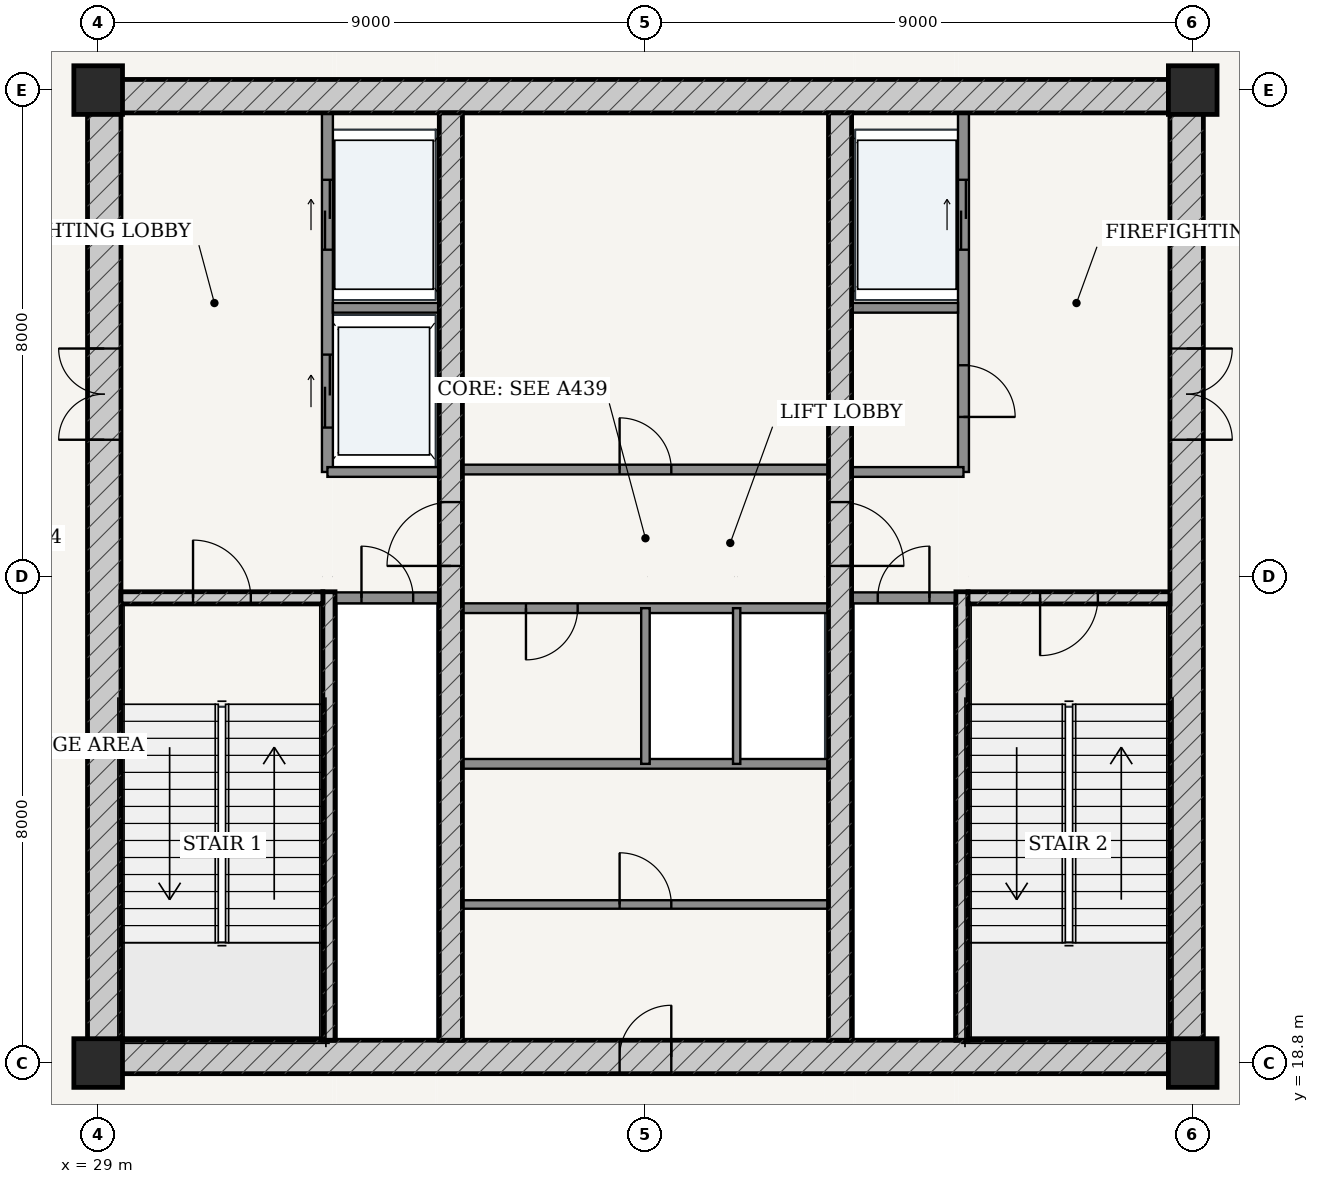
"""IFC4 building model, lengths in metres.
Left out: names, types, materials, properties, quantities, classifications, styles, units other than length and angle.
Written with IfcOpenShell. Run it as: python <this file> out.ifc"""

import sys

from ifc_helpers import new_model, si_unit, direction, frame, frame_2d, origin, origin_2d, place, context, subcontext, project, spatial, rectangle, extrude, source, transform, mapped, element, fill, save


model = new_model("IFC4")
c1 = context("Model", 3, precision=1e-05, world=origin(), true_north=direction((-0.2419218956, 0.970295726276)))
c2 = subcontext(c1, "Body", "Model", "MODEL_VIEW")
j1 = project(units=[si_unit("LENGTHUNIT", "METRE"), si_unit("PLANEANGLEUNIT", "RADIAN")], contexts=[c1])
p1 = place(None, origin())
s1 = spatial("IfcSite", under=j1, at=p1, CompositionType="ELEMENT")
p2 = place(p1, origin())
s2 = spatial("IfcBuilding", under=s1, at=p2, CompositionType="ELEMENT")
p3 = place(p2, frame((0.0, 0.0, 300.7)))
s3 = spatial("IfcBuildingStorey", under=s2, at=p3, CompositionType="ELEMENT", Elevation=300.7)
for number, where, z_axis, x_axis in (
    (1, (29.0, 18.8, 0.0), (0.0, 0.0, 1.0), (1.0, 0.0, 0.0)),
    (2, (47.0, 18.8, 0.0), (0.0, 0.0, 1.0), (1.0, 0.0, 0.0)),
    (3, (47.0, 34.8, 0.0), (0.0, 0.0, 1.0), (1.0, 0.0, 0.0)),
    (4, (29.0, 34.8, 0.0), (0.0, 0.0, 1.0), (1.0, 0.0, 0.0)),
):
    element("IfcColumn", number, at=place(p3, frame(where, z_axis=z_axis, x_axis=x_axis)), inside=s3, PredefinedType="COLUMN", context=c2, shape_type="SweptSolid", body=[
        extrude(rectangle(XDim=0.8, YDim=0.8, at=origin_2d()), origin(), (0.0, 0.0, 1.0), 5.4),
    ])
p4 = place(p3, frame((28.825, 18.9, 0.0), z_axis=(0.0, 0.0, 1.0), x_axis=(1.0, 0.0, 0.0)))
e5 = element("IfcWall", 5, at=p4, inside=s3, PredefinedType="SHEAR", context=c2, shape_type="SweptSolid", body=[
    extrude(rectangle(XDim=18.35, YDim=0.55, at=frame_2d((9.175, 0.0))), origin(), (0.0, 0.0, 1.0), 4.98),
])
p5 = place(p4, frame((8.75, 0.0, 0.0)))
e6 = element("IfcOpeningElement", 6, at=p5, cuts=e5, PredefinedType="OPENING", context=c2, shape_type="SweptSolid", body=[
    extrude(rectangle(XDim=0.85, YDim=2.1, at=frame_2d((0.425, 1.05))), frame((0.0, 0.285, 0.0), z_axis=(0.0, -1.0, 0.0), x_axis=(1.0, 0.0, 0.0)), (0.0, 0.0, 1.0), 0.57),
])
p6 = place(p3, frame((28.825, 34.7, 0.0), z_axis=(0.0, 0.0, 1.0), x_axis=(1.0, 0.0, 0.0)))
e7 = element("IfcWall", 7, at=p6, inside=s3, PredefinedType="SHEAR", context=c2, shape_type="SweptSolid", body=[
    extrude(rectangle(XDim=18.35, YDim=0.55, at=frame_2d((9.175, 0.0))), origin(), (0.0, 0.0, 1.0), 4.98),
])
p7 = place(p3, frame((29.1, 19.175, 0.0), z_axis=(0.0, 0.0, 1.0), x_axis=(0.0, 1.0, 0.0)))
e8 = element("IfcWall", 8, at=p7, inside=s3, PredefinedType="SHEAR", context=c2, shape_type="SweptSolid", body=[
    extrude(rectangle(XDim=15.25, YDim=0.55, at=frame_2d((7.625, 0.0))), origin(), (0.0, 0.0, 1.0), 4.98),
])
p8 = place(p7, frame((9.875, 0.0, 0.0)))
e9 = element("IfcOpeningElement", 9, at=p8, cuts=e8, PredefinedType="OPENING", context=c2, shape_type="SweptSolid", body=[
    extrude(rectangle(XDim=1.5, YDim=2.2, at=frame_2d((0.75, 1.1))), frame((0.0, 0.285, 0.0), z_axis=(0.0, -1.0, 0.0), x_axis=(1.0, 0.0, 0.0)), (0.0, 0.0, 1.0), 0.57),
])
p9 = place(p3, frame((46.9, 19.175, 0.0), z_axis=(0.0, 0.0, 1.0), x_axis=(0.0, 1.0, 0.0)))
e10 = element("IfcWall", 10, at=p9, inside=s3, PredefinedType="SHEAR", context=c2, shape_type="SweptSolid", body=[
    extrude(rectangle(XDim=15.25, YDim=0.55, at=frame_2d((7.625, 0.0))), origin(), (0.0, 0.0, 1.0), 4.98),
])
p10 = place(p9, frame((9.875, 0.0, 0.0)))
e11 = element("IfcOpeningElement", 11, at=p10, cuts=e10, PredefinedType="OPENING", context=c2, shape_type="SweptSolid", body=[
    extrude(rectangle(XDim=1.5, YDim=2.2, at=frame_2d((0.75, 1.1))), frame((0.0, 0.285, 0.0), z_axis=(0.0, -1.0, 0.0), x_axis=(1.0, 0.0, 0.0)), (0.0, 0.0, 1.0), 0.57),
])
p11 = place(p3, frame((32.795, 19.175, 0.0), z_axis=(0.0, 0.0, 1.0), x_axis=(0.0, 1.0, 0.0)))
e12 = element("IfcWall", 12, at=p11, inside=s3, PredefinedType="SOLIDWALL", context=c2, shape_type="SweptSolid", body=[
    extrude(rectangle(XDim=7.375, YDim=0.2, at=frame_2d((3.688, 0.0))), origin(), (0.0, 0.0, 1.0), 4.98),
])
p12 = place(p3, frame((29.375, 26.45, 0.0), z_axis=(0.0, 0.0, 1.0), x_axis=(1.0, 0.0, 0.0)))
e13 = element("IfcWall", 13, at=p12, inside=s3, PredefinedType="SOLIDWALL", context=c2, shape_type="SweptSolid", body=[
    extrude(rectangle(XDim=3.32, YDim=0.2, at=frame_2d((1.66, 0.0))), origin(), (0.0, 0.0, 1.0), 4.98),
])
p13 = place(p12, frame((1.185, 0.0, 0.0)))
e14 = element("IfcOpeningElement", 14, at=p13, cuts=e13, PredefinedType="OPENING", context=c2, shape_type="SweptSolid", body=[
    extrude(rectangle(XDim=0.95, YDim=2.15, at=frame_2d((0.475, 1.075))), frame((0.0, 0.11, 0.0), z_axis=(0.0, -1.0, 0.0), x_axis=(1.0, 0.0, 0.0)), (0.0, 0.0, 1.0), 0.22),
])
p14 = place(p3, frame((43.205, 19.175, 0.0), z_axis=(0.0, 0.0, 1.0), x_axis=(0.0, 1.0, 0.0)))
e15 = element("IfcWall", 15, at=p14, inside=s3, PredefinedType="SOLIDWALL", context=c2, shape_type="SweptSolid", body=[
    extrude(rectangle(XDim=7.375, YDim=0.2, at=frame_2d((3.688, 0.0))), origin(), (0.0, 0.0, 1.0), 4.98),
])
p15 = place(p3, frame((43.305, 26.45, 0.0), z_axis=(0.0, 0.0, 1.0), x_axis=(1.0, 0.0, 0.0)))
e16 = element("IfcWall", 16, at=p15, inside=s3, PredefinedType="SOLIDWALL", context=c2, shape_type="SweptSolid", body=[
    extrude(rectangle(XDim=3.32, YDim=0.2, at=frame_2d((1.66, 0.0))), origin(), (0.0, 0.0, 1.0), 4.98),
])
p16 = place(p15, frame((1.185, 0.0, 0.0)))
e17 = element("IfcOpeningElement", 17, at=p16, cuts=e16, PredefinedType="OPENING", context=c2, shape_type="SweptSolid", body=[
    extrude(rectangle(XDim=0.95, YDim=2.15, at=frame_2d((0.475, 1.075))), frame((0.0, 0.11, 0.0), z_axis=(0.0, -1.0, 0.0), x_axis=(1.0, 0.0, 0.0)), (0.0, 0.0, 1.0), 0.22),
])
p17 = place(p3, frame((34.8, 19.175, 0.0), z_axis=(0.0, 0.0, 1.0), x_axis=(0.0, 1.0, 0.0)))
e18 = element("IfcWall", 18, at=p17, inside=s3, PredefinedType="SHEAR", context=c2, shape_type="SweptSolid", body=[
    extrude(rectangle(XDim=15.25, YDim=0.38, at=frame_2d((7.625, 0.0))), origin(), (0.0, 0.0, 1.0), 4.98),
])
p18 = place(p17, frame((7.8, 0.0, 0.0)))
e19 = element("IfcOpeningElement", 19, at=p18, cuts=e18, PredefinedType="OPENING", context=c2, shape_type="SweptSolid", body=[
    extrude(rectangle(XDim=1.05, YDim=2.15, at=frame_2d((0.525, 1.075))), frame((0.0, 0.2, 0.0), z_axis=(0.0, -1.0, 0.0), x_axis=(1.0, 0.0, 0.0)), (0.0, 0.0, 1.0), 0.4),
])
p19 = place(p3, frame((41.2, 19.175, 0.0), z_axis=(0.0, 0.0, 1.0), x_axis=(0.0, 1.0, 0.0)))
e20 = element("IfcWall", 20, at=p19, inside=s3, PredefinedType="SHEAR", context=c2, shape_type="SweptSolid", body=[
    extrude(rectangle(XDim=15.25, YDim=0.38, at=frame_2d((7.625, 0.0))), origin(), (0.0, 0.0, 1.0), 4.98),
])
p20 = place(p19, frame((7.8, 0.0, 0.0)))
e21 = element("IfcOpeningElement", 21, at=p20, cuts=e20, PredefinedType="OPENING", context=c2, shape_type="SweptSolid", body=[
    extrude(rectangle(XDim=1.05, YDim=2.15, at=frame_2d((0.525, 1.075))), frame((0.0, 0.2, 0.0), z_axis=(0.0, -1.0, 0.0), x_axis=(1.0, 0.0, 0.0)), (0.0, 0.0, 1.0), 0.4),
])
p21 = place(p3, frame((32.9, 26.45, 0.0), z_axis=(0.0, 0.0, 1.0), x_axis=(1.0, 0.0, 0.0)))
e22 = element("IfcWall", 22, at=p21, inside=s3, PredefinedType="PARTITIONING", context=c2, shape_type="SweptSolid", body=[
    extrude(rectangle(XDim=1.71, YDim=0.18, at=frame_2d((0.855, 0.0))), origin(), (0.0, 0.0, 1.0), 4.98),
])
p22 = place(p21, frame((0.43, 0.0, 0.0)))
e23 = element("IfcOpeningElement", 23, at=p22, cuts=e22, PredefinedType="OPENING", context=c2, shape_type="SweptSolid", body=[
    extrude(rectangle(XDim=0.85, YDim=2.1, at=frame_2d((0.425, 1.05))), frame((0.0, 0.1, 0.0), z_axis=(0.0, -1.0, 0.0), x_axis=(1.0, 0.0, 0.0)), (0.0, 0.0, 1.0), 0.2),
])
p23 = place(p3, frame((41.39, 26.45, 0.0), z_axis=(0.0, 0.0, 1.0), x_axis=(1.0, 0.0, 0.0)))
e24 = element("IfcWall", 24, at=p23, inside=s3, PredefinedType="PARTITIONING", context=c2, shape_type="SweptSolid", body=[
    extrude(rectangle(XDim=1.71, YDim=0.18, at=frame_2d((0.855, 0.0))), origin(), (0.0, 0.0, 1.0), 4.98),
])
p24 = place(p23, frame((0.43, 0.0, 0.0)))
e25 = element("IfcOpeningElement", 25, at=p24, cuts=e24, PredefinedType="OPENING", context=c2, shape_type="SweptSolid", body=[
    extrude(rectangle(XDim=0.85, YDim=2.1, at=frame_2d((0.425, 1.05))), frame((0.0, 0.1, 0.0), z_axis=(0.0, -1.0, 0.0), x_axis=(1.0, 0.0, 0.0)), (0.0, 0.0, 1.0), 0.2),
])
p25 = place(p3, frame((32.77, 28.52, 0.0), z_axis=(0.0, 0.0, 1.0), x_axis=(0.0, 1.0, 0.0)))
e26 = element("IfcWall", 26, at=p25, inside=s3, PredefinedType="PARTITIONING", context=c2, shape_type="SweptSolid", body=[
    extrude(rectangle(XDim=5.905, YDim=0.18, at=frame_2d((2.953, 0.0))), origin(), (0.0, 0.0, 1.0), 4.98),
])
p26 = place(p25, frame((3.655, 0.0, 0.0)))
e27 = element("IfcOpeningElement", 27, at=p26, cuts=e26, PredefinedType="OPENING", context=c2, shape_type="SweptSolid", body=[
    extrude(rectangle(XDim=1.15, YDim=2.2, at=frame_2d((0.575, 1.1))), frame((0.0, 0.1, 0.0), z_axis=(0.0, -1.0, 0.0), x_axis=(1.0, 0.0, 0.0)), (0.0, 0.0, 1.0), 0.2),
])
p27 = place(p25, frame((0.73, 0.0, 0.0)))
e28 = element("IfcOpeningElement", 28, at=p27, cuts=e26, PredefinedType="OPENING", context=c2, shape_type="SweptSolid", body=[
    extrude(rectangle(XDim=1.2, YDim=2.25, at=frame_2d((0.6, 1.125))), frame((0.0, 0.1, 0.0), z_axis=(0.0, -1.0, 0.0), x_axis=(1.0, 0.0, 0.0)), (0.0, 0.0, 1.0), 0.2),
])
p28 = place(p3, frame((32.86, 31.22, 0.0), z_axis=(0.0, 0.0, 1.0), x_axis=(1.0, 0.0, 0.0)))
e29 = element("IfcWall", 29, at=p28, inside=s3, PredefinedType="PARTITIONING", context=c2, shape_type="SweptSolid", body=[
    extrude(rectangle(XDim=1.75, YDim=0.16, at=frame_2d((0.875, 0.0))), origin(), (0.0, 0.0, 1.0), 4.98),
])
p29 = place(p3, frame((32.77, 28.52, 0.0), z_axis=(0.0, 0.0, 1.0), x_axis=(1.0, 0.0, 0.0)))
e30 = element("IfcWall", 30, at=p29, inside=s3, PredefinedType="PARTITIONING", context=c2, shape_type="SweptSolid", body=[
    extrude(rectangle(XDim=1.84, YDim=0.16, at=frame_2d((0.92, 0.0))), origin(), (0.0, 0.0, 1.0), 4.98),
])
p30 = place(p3, frame((43.23, 28.52, 0.0), z_axis=(0.0, 0.0, 1.0), x_axis=(0.0, 1.0, 0.0)))
e31 = element("IfcWall", 31, at=p30, inside=s3, PredefinedType="PARTITIONING", context=c2, shape_type="SweptSolid", body=[
    extrude(rectangle(XDim=5.905, YDim=0.18, at=frame_2d((2.953, 0.0))), origin(), (0.0, 0.0, 1.0), 4.98),
])
p31 = place(p30, frame((0.905, 0.0, 0.0)))
e32 = element("IfcOpeningElement", 32, at=p31, cuts=e31, PredefinedType="OPENING", context=c2, shape_type="SweptSolid", body=[
    extrude(rectangle(XDim=0.85, YDim=2.1, at=frame_2d((0.425, 1.05))), frame((0.0, 0.1, 0.0), z_axis=(0.0, -1.0, 0.0), x_axis=(1.0, 0.0, 0.0)), (0.0, 0.0, 1.0), 0.2),
])
p32 = place(p30, frame((3.655, 0.0, 0.0)))
e33 = element("IfcOpeningElement", 33, at=p32, cuts=e31, PredefinedType="OPENING", context=c2, shape_type="SweptSolid", body=[
    extrude(rectangle(XDim=1.15, YDim=2.2, at=frame_2d((0.575, 1.1))), frame((0.0, 0.1, 0.0), z_axis=(0.0, -1.0, 0.0), x_axis=(1.0, 0.0, 0.0)), (0.0, 0.0, 1.0), 0.2),
])
p33 = place(p3, frame((41.39, 31.22, 0.0), z_axis=(0.0, 0.0, 1.0), x_axis=(1.0, 0.0, 0.0)))
e34 = element("IfcWall", 34, at=p33, inside=s3, PredefinedType="PARTITIONING", context=c2, shape_type="SweptSolid", body=[
    extrude(rectangle(XDim=1.75, YDim=0.16, at=frame_2d((0.875, 0.0))), origin(), (0.0, 0.0, 1.0), 4.98),
])
p34 = place(p3, frame((41.39, 28.52, 0.0), z_axis=(0.0, 0.0, 1.0), x_axis=(1.0, 0.0, 0.0)))
e35 = element("IfcWall", 35, at=p34, inside=s3, PredefinedType="PARTITIONING", context=c2, shape_type="SweptSolid", body=[
    extrude(rectangle(XDim=1.84, YDim=0.16, at=frame_2d((0.92, 0.0))), origin(), (0.0, 0.0, 1.0), 4.98),
])
p35 = place(p3, frame((34.99, 28.56, 0.0), z_axis=(0.0, 0.0, 1.0), x_axis=(1.0, 0.0, 0.0)))
e36 = element("IfcWall", 36, at=p35, inside=s3, PredefinedType="PARTITIONING", context=c2, shape_type="SweptSolid", body=[
    extrude(rectangle(XDim=6.02, YDim=0.16, at=frame_2d((3.01, 0.0))), origin(), (0.0, 0.0, 1.0), 4.98),
])
p36 = place(p35, frame((2.585, 0.0, 0.0)))
e37 = element("IfcOpeningElement", 37, at=p36, cuts=e36, PredefinedType="OPENING", context=c2, shape_type="SweptSolid", body=[
    extrude(rectangle(XDim=0.85, YDim=2.1, at=frame_2d((0.425, 1.05))), frame((0.0, 0.09, 0.0), z_axis=(0.0, -1.0, 0.0), x_axis=(1.0, 0.0, 0.0)), (0.0, 0.0, 1.0), 0.18),
])
p37 = place(p3, frame((34.99, 26.28, 0.0), z_axis=(0.0, 0.0, 1.0), x_axis=(1.0, 0.0, 0.0)))
e38 = element("IfcWall", 38, at=p37, inside=s3, PredefinedType="PARTITIONING", context=c2, shape_type="SweptSolid", body=[
    extrude(rectangle(XDim=6.02, YDim=0.16, at=frame_2d((3.01, 0.0))), origin(), (0.0, 0.0, 1.0), 4.98),
])
p38 = place(p37, frame((1.045, 0.0, 0.0)))
e39 = element("IfcOpeningElement", 39, at=p38, cuts=e38, PredefinedType="OPENING", context=c2, shape_type="SweptSolid", body=[
    extrude(rectangle(XDim=0.85, YDim=2.1, at=frame_2d((0.425, 1.05))), frame((0.0, 0.09, 0.0), z_axis=(0.0, -1.0, 0.0), x_axis=(1.0, 0.0, 0.0)), (0.0, 0.0, 1.0), 0.18),
])
p39 = place(p3, frame((34.99, 23.72, 0.0), z_axis=(0.0, 0.0, 1.0), x_axis=(1.0, 0.0, 0.0)))
e40 = element("IfcWall", 40, at=p39, inside=s3, PredefinedType="PARTITIONING", context=c2, shape_type="SweptSolid", body=[
    extrude(rectangle(XDim=6.02, YDim=0.16, at=frame_2d((3.01, 0.0))), origin(), (0.0, 0.0, 1.0), 4.98),
])
p40 = place(p3, frame((38.0, 23.72, 0.0), z_axis=(0.0, 0.0, 1.0), x_axis=(0.0, 1.0, 0.0)))
e41 = element("IfcWall", 41, at=p40, inside=s3, PredefinedType="PARTITIONING", context=c2, shape_type="SweptSolid", body=[
    extrude(rectangle(XDim=2.56, YDim=0.14, at=frame_2d((1.28, 0.0))), origin(), (0.0, 0.0, 1.0), 4.98),
])
p41 = place(p3, frame((39.5, 23.72, 0.0), z_axis=(0.0, 0.0, 1.0), x_axis=(0.0, 1.0, 0.0)))
e42 = element("IfcWall", 42, at=p41, inside=s3, PredefinedType="PARTITIONING", context=c2, shape_type="SweptSolid", body=[
    extrude(rectangle(XDim=2.56, YDim=0.12, at=frame_2d((1.28, 0.0))), origin(), (0.0, 0.0, 1.0), 4.98),
])
p42 = place(p3, frame((34.99, 21.407, 0.0), z_axis=(0.0, 0.0, 1.0), x_axis=(1.0, 0.0, 0.0)))
e43 = element("IfcWall", 43, at=p42, inside=s3, PredefinedType="PARTITIONING", context=c2, shape_type="SweptSolid", body=[
    extrude(rectangle(XDim=6.02, YDim=0.14, at=frame_2d((3.01, 0.0))), origin(), (0.0, 0.0, 1.0), 4.98),
])
p43 = place(p42, frame((2.585, 0.0, 0.0)))
e44 = element("IfcOpeningElement", 44, at=p43, cuts=e43, PredefinedType="OPENING", context=c2, shape_type="SweptSolid", body=[
    extrude(rectangle(XDim=0.85, YDim=2.1, at=frame_2d((0.425, 1.05))), frame((0.0, 0.08, 0.0), z_axis=(0.0, -1.0, 0.0), x_axis=(1.0, 0.0, 0.0)), (0.0, 0.0, 1.0), 0.16),
])
m1 = source(origin(), c2, "Body", "SweptSolid", [
    extrude(rectangle(XDim=1.5, YDim=2.2, at=frame_2d((0.75, 1.1))), frame((0.0, 0.025, 0.0), z_axis=(0.0, -1.0, 0.0), x_axis=(1.0, 0.0, 0.0)), (0.0, 0.0, 1.0), 0.05),
])
p44 = place(p8, origin())
e45 = element("IfcDoor", 45, at=p44, inside=s3, OperationType="DOUBLE_DOOR_SINGLE_SWING", PredefinedType="DOOR", context=c2, shape_type="MappedRepresentation", body=[
    mapped(m1, transform((0.0, 0.0, 0.0), scale=1.0)),
])
fill(e9, e45)
p45 = place(p10, frame((1.5, 0.0, 0.0), z_axis=(0.0, 0.0, 1.0), x_axis=(-1.0, 0.0, 0.0)))
e46 = element("IfcDoor", 46, at=p45, inside=s3, OperationType="DOUBLE_DOOR_SINGLE_SWING", PredefinedType="DOOR", context=c2, shape_type="MappedRepresentation", body=[
    mapped(m1, transform((0.0, 0.0, 0.0), scale=1.0)),
])
fill(e11, e46)
m2 = source(origin(), c2, "Body", "SweptSolid", [
    extrude(rectangle(XDim=1.05, YDim=2.15, at=frame_2d((0.525, 1.075))), frame((0.0, 0.025, 0.0), z_axis=(0.0, -1.0, 0.0), x_axis=(1.0, 0.0, 0.0)), (0.0, 0.0, 1.0), 0.05),
])
p46 = place(p18, origin())
e47 = element("IfcDoor", 47, at=p46, inside=s3, OperationType="SINGLE_SWING_LEFT", PredefinedType="DOOR", context=c2, shape_type="MappedRepresentation", body=[
    mapped(m2, transform((0.0, 0.0, 0.0), scale=1.0)),
])
fill(e19, e47)
p47 = place(p20, frame((1.05, 0.0, 0.0), z_axis=(0.0, 0.0, 1.0), x_axis=(-1.0, 0.0, 0.0)))
e48 = element("IfcDoor", 48, at=p47, inside=s3, OperationType="SINGLE_SWING_RIGHT", PredefinedType="DOOR", context=c2, shape_type="MappedRepresentation", body=[
    mapped(m2, transform((0.0, 0.0, 0.0), scale=1.0)),
])
fill(e21, e48)
m3 = source(origin(), c2, "Body", "SweptSolid", [
    extrude(rectangle(XDim=0.95, YDim=2.15, at=frame_2d((0.475, 1.075))), frame((0.0, 0.025, 0.0), z_axis=(0.0, -1.0, 0.0), x_axis=(1.0, 0.0, 0.0)), (0.0, 0.0, 1.0), 0.05),
])
p48 = place(p13, origin())
e49 = element("IfcDoor", 49, at=p48, inside=s3, OperationType="SINGLE_SWING_LEFT", PredefinedType="DOOR", context=c2, shape_type="MappedRepresentation", body=[
    mapped(m3, transform((0.0, 0.0, 0.0), scale=1.0)),
])
fill(e14, e49)
p49 = place(p16, frame((0.95, 0.0, 0.0), z_axis=(0.0, 0.0, 1.0), x_axis=(-1.0, 0.0, 0.0)))
e50 = element("IfcDoor", 50, at=p49, inside=s3, OperationType="SINGLE_SWING_RIGHT", PredefinedType="DOOR", context=c2, shape_type="MappedRepresentation", body=[
    mapped(m3, transform((0.0, 0.0, 0.0), scale=1.0)),
])
fill(e17, e50)
m4 = source(origin(), c2, "Body", "SweptSolid", [
    extrude(rectangle(XDim=0.85, YDim=2.1, at=frame_2d((0.425, 1.05))), frame((0.0, 0.025, 0.0), z_axis=(0.0, -1.0, 0.0), x_axis=(1.0, 0.0, 0.0)), (0.0, 0.0, 1.0), 0.05),
])
p50 = place(p22, origin())
e51 = element("IfcDoor", 51, at=p50, inside=s3, OperationType="SINGLE_SWING_LEFT", PredefinedType="DOOR", context=c2, shape_type="MappedRepresentation", body=[
    mapped(m4, transform((0.0, 0.0, 0.0), scale=1.0)),
])
fill(e23, e51)
p51 = place(p24, origin())
e52 = element("IfcDoor", 52, at=p51, inside=s3, OperationType="SINGLE_SWING_RIGHT", PredefinedType="DOOR", context=c2, shape_type="MappedRepresentation", body=[
    mapped(m4, transform((0.0, 0.0, 0.0), scale=1.0)),
])
fill(e25, e52)
p52 = place(p31, frame((0.85, 0.0, 0.0), z_axis=(0.0, 0.0, 1.0), x_axis=(-1.0, 0.0, 0.0)))
e53 = element("IfcDoor", 53, at=p52, inside=s3, OperationType="SINGLE_SWING_RIGHT", PredefinedType="DOOR", context=c2, shape_type="MappedRepresentation", body=[
    mapped(m4, transform((0.0, 0.0, 0.0), scale=1.0)),
])
fill(e32, e53)
p53 = place(p36, origin())
e54 = element("IfcDoor", 54, at=p53, inside=s3, OperationType="SINGLE_SWING_LEFT", PredefinedType="DOOR", context=c2, shape_type="MappedRepresentation", body=[
    mapped(m4, transform((0.0, 0.0, 0.0), scale=1.0)),
])
fill(e37, e54)
p54 = place(p38, frame((0.85, 0.0, 0.0), z_axis=(0.0, 0.0, 1.0), x_axis=(-1.0, 0.0, 0.0)))
e55 = element("IfcDoor", 55, at=p54, inside=s3, OperationType="SINGLE_SWING_RIGHT", PredefinedType="DOOR", context=c2, shape_type="MappedRepresentation", body=[
    mapped(m4, transform((0.0, 0.0, 0.0), scale=1.0)),
])
fill(e39, e55)
p55 = place(p5, origin())
e56 = element("IfcDoor", 56, at=p55, inside=s3, OperationType="SINGLE_SWING_RIGHT", PredefinedType="DOOR", context=c2, shape_type="MappedRepresentation", body=[
    mapped(m4, transform((0.0, 0.0, 0.0), scale=1.0)),
])
fill(e6, e56)
p56 = place(p43, origin())
e57 = element("IfcDoor", 57, at=p56, inside=s3, OperationType="SINGLE_SWING_LEFT", PredefinedType="DOOR", context=c2, shape_type="MappedRepresentation", body=[
    mapped(m4, transform((0.0, 0.0, 0.0), scale=1.0)),
])
fill(e44, e57)
m5 = source(origin(), c2, "Body", "SweptSolid", [
    extrude(rectangle(XDim=1.15, YDim=2.2, at=frame_2d((0.575, 1.1))), frame((0.0, 0.025, 0.0), z_axis=(0.0, -1.0, 0.0), x_axis=(1.0, 0.0, 0.0)), (0.0, 0.0, 1.0), 0.05),
])
p57 = place(p26, origin())
e58 = element("IfcDoor", 58, at=p57, inside=s3, OperationType="DOUBLE_DOOR_SLIDING", PredefinedType="DOOR", context=c2, shape_type="MappedRepresentation", body=[
    mapped(m5, transform((0.0, 0.0, 0.0), scale=1.0)),
])
fill(e27, e58)
p58 = place(p32, origin())
e59 = element("IfcDoor", 59, at=p58, inside=s3, OperationType="DOUBLE_DOOR_SLIDING", PredefinedType="DOOR", context=c2, shape_type="MappedRepresentation", body=[
    mapped(m5, transform((0.0, 0.0, 0.0), scale=1.0)),
])
fill(e33, e59)
m6 = source(origin(), c2, "Body", "SweptSolid", [
    extrude(rectangle(XDim=1.2, YDim=2.25, at=frame_2d((0.6, 1.125))), frame((0.0, 0.025, 0.0), z_axis=(0.0, -1.0, 0.0), x_axis=(1.0, 0.0, 0.0)), (0.0, 0.0, 1.0), 0.05),
])
p59 = place(p27, origin())
e60 = element("IfcDoor", 60, at=p59, inside=s3, OperationType="DOUBLE_DOOR_SLIDING", PredefinedType="DOOR", context=c2, shape_type="MappedRepresentation", body=[
    mapped(m6, transform((0.0, 0.0, 0.0), scale=1.0)),
])
fill(e28, e60)
save(model, sys.argv[1])
